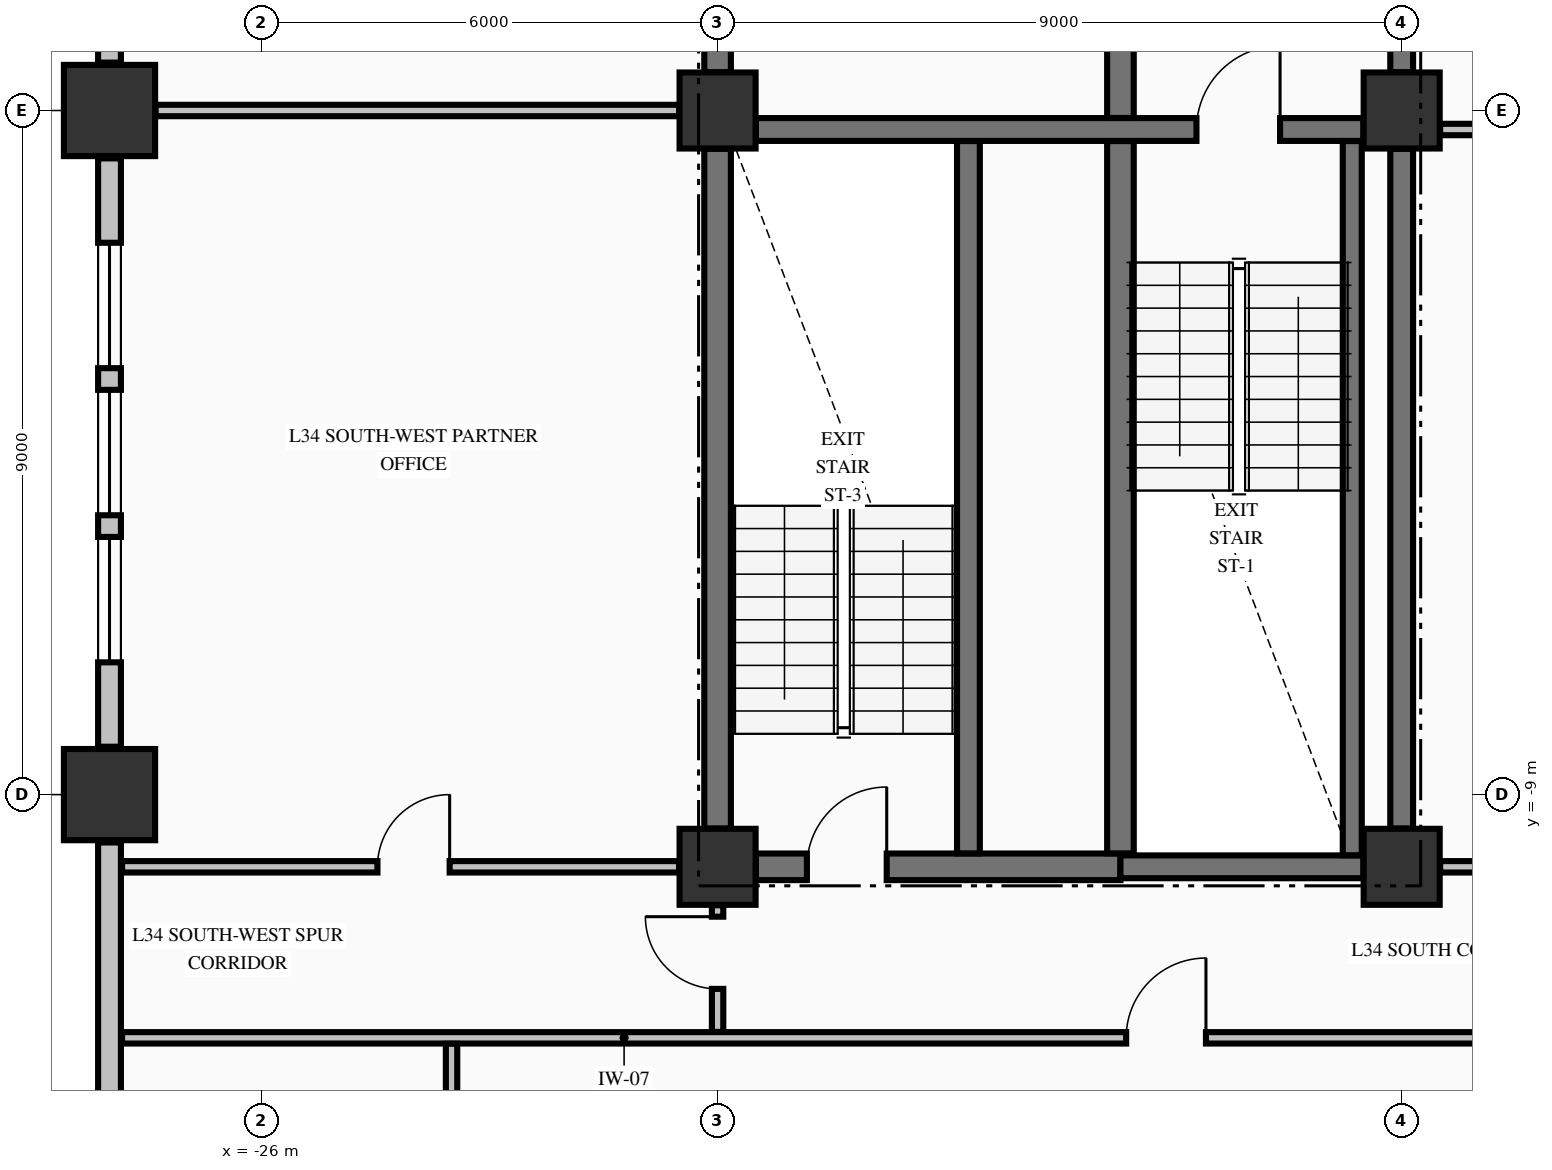
"""IFC4 building model, lengths in metres.
Left out: names, types, materials, properties, quantities, classifications, styles, units other than length and angle.
Written with IfcOpenShell. Run it as: python <this file> out.ifc"""

import sys

from ifc_helpers import new_model, si_unit, direction, frame, frame_2d, origin, origin_2d, place, context, subcontext, project, spatial, rectangle, extrude, element, fill, save


model = new_model("IFC4")
c1 = context("Model", 3, precision=1e-05, world=origin(), true_north=direction((0.0, 1.0)))
c2 = subcontext(c1, "Body", "Model", "MODEL_VIEW")
j1 = project(units=[si_unit("LENGTHUNIT", "METRE"), si_unit("PLANEANGLEUNIT", "RADIAN")], contexts=[c1])
p1 = place(None, origin())
s1 = spatial("IfcSite", under=j1, at=p1, CompositionType="ELEMENT")
p2 = place(p1, origin())
s2 = spatial("IfcBuilding", under=s1, at=p2, CompositionType="ELEMENT")
p3 = place(p2, frame((0.0, 0.0, 135.63)))
s3 = spatial("IfcBuildingStorey", under=s2, at=p3, CompositionType="ELEMENT", Elevation=135.63)
for number, where, z_axis, x_axis in (
    (1, (-28.0, -9.0, -0.25), (0.0, 0.0, 1.0), (1.0, 0.0, 0.0)),
    (2, (-28.0, 0.0, -0.25), (0.0, 0.0, 1.0), (1.0, 0.0, 0.0)),
):
    element("IfcColumn", number, at=place(p3, frame(where, z_axis=z_axis, x_axis=x_axis)), inside=s3, PredefinedType="COLUMN", context=c2, shape_type="SweptSolid", body=[
        extrude(rectangle(XDim=1.2, YDim=1.2, at=origin_2d()), origin(), (0.0, 0.0, 1.0), 3.57),
    ])
for number, where, z_axis, x_axis in (
    (3, (-20.0, -9.95, -0.25), (0.0, 0.0, 1.0), (1.0, 0.0, 0.0)),
    (4, (-11.0, -9.95, -0.25), (0.0, 0.0, 1.0), (1.0, 0.0, 0.0)),
    (5, (-11.0, 0.0, -0.25), (0.0, 0.0, 1.0), (1.0, 0.0, 0.0)),
    (6, (-20.0, 0.0, -0.25), (0.0, 0.0, 1.0), (1.0, 0.0, 0.0)),
):
    element("IfcColumn", number, at=place(p3, frame(where, z_axis=z_axis, x_axis=x_axis)), inside=s3, PredefinedType="COLUMN", context=c2, shape_type="SweptSolid", body=[
        extrude(rectangle(XDim=1.0, YDim=1.0, at=origin_2d()), origin(), (0.0, 0.0, 1.0), 3.57),
    ])
p4 = place(p3, frame((-28.0, -9.63, 0.0), z_axis=(0.0, 0.0, 1.0), x_axis=(0.0, -1.0, 0.0)))
e7 = element("IfcWall", 7, at=p4, inside=s3, PredefinedType="STANDARD", context=c2, shape_type="SweptSolid", body=[
    extrude(rectangle(XDim=10.74, YDim=0.3, at=frame_2d((5.37, 0.0))), origin(), (0.0, 0.0, 1.0), 2.712),
])
p5 = place(p3, frame((-28.0, -0.63, 0.0), z_axis=(0.0, 0.0, 1.0), x_axis=(0.0, -1.0, 0.0)))
e8 = element("IfcWall", 8, at=p5, inside=s3, PredefinedType="STANDARD", context=c2, shape_type="SweptSolid", body=[
    extrude(rectangle(XDim=7.74, YDim=0.3, at=frame_2d((3.87, 0.0))), origin(), (0.0, 0.0, 1.0), 2.712),
])
p6 = place(p5, frame((1.11, 0.0, 0.8)))
e9 = element("IfcOpeningElement", 9, at=p6, cuts=e8, PredefinedType="OPENING", context=c2, shape_type="SweptSolid", body=[
    extrude(rectangle(XDim=1.65, YDim=1.7, at=frame_2d((0.825, 0.85))), frame((0.0, 0.16, 0.0), z_axis=(0.0, -1.0, 0.0), x_axis=(1.0, 0.0, 0.0)), (0.0, 0.0, 1.0), 0.32),
])
p7 = place(p5, frame((3.045, 0.0, 0.8)))
e10 = element("IfcOpeningElement", 10, at=p7, cuts=e8, PredefinedType="OPENING", context=c2, shape_type="SweptSolid", body=[
    extrude(rectangle(XDim=1.65, YDim=1.7, at=frame_2d((0.825, 0.85))), frame((0.0, 0.16, 0.0), z_axis=(0.0, -1.0, 0.0), x_axis=(1.0, 0.0, 0.0)), (0.0, 0.0, 1.0), 0.32),
])
p8 = place(p5, frame((4.98, 0.0, 0.8)))
e11 = element("IfcOpeningElement", 11, at=p8, cuts=e8, PredefinedType="OPENING", context=c2, shape_type="SweptSolid", body=[
    extrude(rectangle(XDim=1.65, YDim=1.7, at=frame_2d((0.825, 0.85))), frame((0.0, 0.16, 0.0), z_axis=(0.0, -1.0, 0.0), x_axis=(1.0, 0.0, 0.0)), (0.0, 0.0, 1.0), 0.32),
])
p9 = place(p3, frame((-28.0, 8.37, 0.0), z_axis=(0.0, 0.0, 1.0), x_axis=(0.0, -1.0, 0.0)))
e12 = element("IfcWall", 12, at=p9, inside=s3, PredefinedType="STANDARD", context=c2, shape_type="SweptSolid", body=[
    extrude(rectangle(XDim=7.74, YDim=0.3, at=frame_2d((3.87, 0.0))), origin(), (0.0, 0.0, 1.0), 2.712),
])
p10 = place(p9, frame((1.11, 0.0, 0.8)))
e13 = element("IfcOpeningElement", 13, at=p10, cuts=e12, PredefinedType="OPENING", context=c2, shape_type="SweptSolid", body=[
    extrude(rectangle(XDim=1.65, YDim=1.7, at=frame_2d((0.825, 0.85))), frame((0.0, 0.16, 0.0), z_axis=(0.0, -1.0, 0.0), x_axis=(1.0, 0.0, 0.0)), (0.0, 0.0, 1.0), 0.32),
])
p11 = place(p9, frame((3.045, 0.0, 0.8)))
e14 = element("IfcOpeningElement", 14, at=p11, cuts=e12, PredefinedType="OPENING", context=c2, shape_type="SweptSolid", body=[
    extrude(rectangle(XDim=1.65, YDim=1.7, at=frame_2d((0.825, 0.85))), frame((0.0, 0.16, 0.0), z_axis=(0.0, -1.0, 0.0), x_axis=(1.0, 0.0, 0.0)), (0.0, 0.0, 1.0), 0.32),
])
p12 = place(p9, frame((4.98, 0.0, 0.8)))
e15 = element("IfcOpeningElement", 15, at=p12, cuts=e12, PredefinedType="OPENING", context=c2, shape_type="SweptSolid", body=[
    extrude(rectangle(XDim=1.65, YDim=1.7, at=frame_2d((0.825, 0.85))), frame((0.0, 0.16, 0.0), z_axis=(0.0, -1.0, 0.0), x_axis=(1.0, 0.0, 0.0)), (0.0, 0.0, 1.0), 0.32),
])
p13 = place(p3, frame((-19.496, -9.95, 0.0), z_axis=(0.0, 0.0, 1.0), x_axis=(1.0, 0.0, 0.0)))
e16 = element("IfcWall", 16, at=p13, inside=s3, PredefinedType="SHEAR", context=c2, shape_type="SweptSolid", body=[
    extrude(rectangle(XDim=4.796, YDim=0.35, at=frame_2d((2.398, 0.0))), origin(), (0.0, 0.0, 1.0), 3.32),
])
p14 = place(p13, frame((0.671, 0.0, 0.0)))
e17 = element("IfcOpeningElement", 17, at=p14, cuts=e16, PredefinedType="OPENING", context=c2, shape_type="SweptSolid", body=[
    extrude(rectangle(XDim=1.05, YDim=2.15, at=frame_2d((0.525, 1.075))), frame((0.0, 0.185, 0.0), z_axis=(0.0, -1.0, 0.0), x_axis=(1.0, 0.0, 0.0)), (0.0, 0.0, 1.0), 0.37),
])
p15 = place(p3, frame((-14.7, -9.95, 0.0), z_axis=(0.0, 0.0, 1.0), x_axis=(1.0, 0.0, 0.0)))
e18 = element("IfcWall", 18, at=p15, inside=s3, PredefinedType="SHEAR", context=c2, shape_type="SweptSolid", body=[
    extrude(rectangle(XDim=3.196, YDim=0.3, at=frame_2d((1.598, 0.0))), origin(), (0.0, 0.0, 1.0), 3.32),
])
p16 = place(p3, frame((-19.496, -0.25, 0.0), z_axis=(0.0, 0.0, 1.0), x_axis=(1.0, 0.0, 0.0)))
e19 = element("IfcWall", 19, at=p16, inside=s3, PredefinedType="SHEAR", context=c2, shape_type="SweptSolid", body=[
    extrude(rectangle(XDim=7.992, YDim=0.3, at=frame_2d((3.996, 0.0))), origin(), (0.0, 0.0, 1.0), 3.32),
])
p17 = place(p16, frame((5.796, 0.0, 0.0)))
e20 = element("IfcOpeningElement", 20, at=p17, cuts=e19, PredefinedType="OPENING", context=c2, shape_type="SweptSolid", body=[
    extrude(rectangle(XDim=1.1, YDim=2.15, at=frame_2d((0.55, 1.075))), frame((0.0, 0.16, 0.0), z_axis=(0.0, -1.0, 0.0), x_axis=(1.0, 0.0, 0.0)), (0.0, 0.0, 1.0), 0.32),
])
p18 = place(p3, frame((-27.835, -12.2, 0.0), z_axis=(0.0, 0.0, 1.0), x_axis=(1.0, 0.0, 0.0)))
e21 = element("IfcWall", 21, at=p18, inside=s3, PredefinedType="PARTITIONING", context=c2, shape_type="SweptSolid", body=[
    extrude(rectangle(XDim=50.67, YDim=0.15, at=frame_2d((25.335, 0.0))), origin(), (0.0, 0.0, 1.0), 3.32),
])
p19 = place(p18, frame((13.21, 0.0, 0.0)))
e22 = element("IfcOpeningElement", 22, at=p19, cuts=e21, PredefinedType="OPENING", context=c2, shape_type="SweptSolid", body=[
    extrude(rectangle(XDim=1.05, YDim=2.15, at=frame_2d((0.525, 1.075))), frame((0.0, 0.085, 0.0), z_axis=(0.0, -1.0, 0.0), x_axis=(1.0, 0.0, 0.0)), (0.0, 0.0, 1.0), 0.17),
])
p20 = place(p18, frame((23.11, 0.0, 0.0)))
e23 = element("IfcOpeningElement", 23, at=p20, cuts=e21, PredefinedType="OPENING", context=c2, shape_type="SweptSolid", body=[
    extrude(rectangle(XDim=1.05, YDim=2.15, at=frame_2d((0.525, 1.075))), frame((0.0, 0.085, 0.0), z_axis=(0.0, -1.0, 0.0), x_axis=(1.0, 0.0, 0.0)), (0.0, 0.0, 1.0), 0.17),
])
p21 = place(p18, frame((31.51, 0.0, 0.0)))
e24 = element("IfcOpeningElement", 24, at=p21, cuts=e21, PredefinedType="OPENING", context=c2, shape_type="SweptSolid", body=[
    extrude(rectangle(XDim=1.05, YDim=2.15, at=frame_2d((0.525, 1.075))), frame((0.0, 0.085, 0.0), z_axis=(0.0, -1.0, 0.0), x_axis=(1.0, 0.0, 0.0)), (0.0, 0.0, 1.0), 0.17),
])
p22 = place(p18, frame((40.76, 0.0, 0.0)))
e25 = element("IfcOpeningElement", 25, at=p22, cuts=e21, PredefinedType="OPENING", context=c2, shape_type="SweptSolid", body=[
    extrude(rectangle(XDim=1.05, YDim=2.15, at=frame_2d((0.525, 1.075))), frame((0.0, 0.085, 0.0), z_axis=(0.0, -1.0, 0.0), x_axis=(1.0, 0.0, 0.0)), (0.0, 0.0, 1.0), 0.17),
])
p23 = place(p3, frame((-27.835, -9.95, 0.0), z_axis=(0.0, 0.0, 1.0), x_axis=(1.0, 0.0, 0.0)))
e26 = element("IfcWall", 26, at=p23, inside=s3, PredefinedType="PARTITIONING", context=c2, shape_type="SweptSolid", body=[
    extrude(rectangle(XDim=7.329, YDim=0.15, at=frame_2d((3.665, 0.0))), origin(), (0.0, 0.0, 1.0), 3.32),
])
p24 = place(p23, frame((3.36, 0.0, 0.0)))
e27 = element("IfcOpeningElement", 27, at=p24, cuts=e26, PredefinedType="OPENING", context=c2, shape_type="SweptSolid", body=[
    extrude(rectangle(XDim=0.95, YDim=2.15, at=frame_2d((0.475, 1.075))), frame((0.0, 0.085, 0.0), z_axis=(0.0, -1.0, 0.0), x_axis=(1.0, 0.0, 0.0)), (0.0, 0.0, 1.0), 0.17),
])
p25 = place(p3, frame((-10.494, -9.95, 0.0), z_axis=(0.0, 0.0, 1.0), x_axis=(1.0, 0.0, 0.0)))
e28 = element("IfcWall", 28, at=p25, inside=s3, PredefinedType="PARTITIONING", context=c2, shape_type="SweptSolid", body=[
    extrude(rectangle(XDim=20.988, YDim=0.15, at=frame_2d((10.494, 0.0))), origin(), (0.0, 0.0, 1.0), 3.32),
])
p26 = place(p25, frame((8.194, 0.0, 0.0)))
e29 = element("IfcOpeningElement", 29, at=p26, cuts=e28, PredefinedType="OPENING", context=c2, shape_type="SweptSolid", body=[
    extrude(rectangle(XDim=1.1, YDim=2.15, at=frame_2d((0.55, 1.075))), frame((0.0, 0.085, 0.0), z_axis=(0.0, -1.0, 0.0), x_axis=(1.0, 0.0, 0.0)), (0.0, 0.0, 1.0), 0.17),
])
p27 = place(p25, frame((13.619, 0.0, 0.0)))
e30 = element("IfcOpeningElement", 30, at=p27, cuts=e28, PredefinedType="OPENING", context=c2, shape_type="SweptSolid", body=[
    extrude(rectangle(XDim=0.95, YDim=2.15, at=frame_2d((0.475, 1.075))), frame((0.0, 0.085, 0.0), z_axis=(0.0, -1.0, 0.0), x_axis=(1.0, 0.0, 0.0)), (0.0, 0.0, 1.0), 0.17),
])
p28 = place(p25, frame((17.844, 0.0, 0.0)))
e31 = element("IfcOpeningElement", 31, at=p28, cuts=e28, PredefinedType="OPENING", context=c2, shape_type="SweptSolid", body=[
    extrude(rectangle(XDim=0.9, YDim=2.15, at=frame_2d((0.45, 1.075))), frame((0.0, 0.085, 0.0), z_axis=(0.0, -1.0, 0.0), x_axis=(1.0, 0.0, 0.0)), (0.0, 0.0, 1.0), 0.17),
])
p29 = place(p3, frame((-10.494, -0.25, 0.0), z_axis=(0.0, 0.0, 1.0), x_axis=(1.0, 0.0, 0.0)))
e32 = element("IfcWall", 32, at=p29, inside=s3, PredefinedType="PARTITIONING", context=c2, shape_type="SweptSolid", body=[
    extrude(rectangle(XDim=20.988, YDim=0.15, at=frame_2d((10.494, 0.0))), origin(), (0.0, 0.0, 1.0), 3.32),
])
p30 = place(p29, frame((8.194, 0.0, 0.0)))
e33 = element("IfcOpeningElement", 33, at=p30, cuts=e32, PredefinedType="OPENING", context=c2, shape_type="SweptSolid", body=[
    extrude(rectangle(XDim=1.1, YDim=2.15, at=frame_2d((0.55, 1.075))), frame((0.0, 0.085, 0.0), z_axis=(0.0, -1.0, 0.0), x_axis=(1.0, 0.0, 0.0)), (0.0, 0.0, 1.0), 0.17),
])
p31 = place(p29, frame((3.049, 0.0, 0.0)))
e34 = element("IfcOpeningElement", 34, at=p31, cuts=e32, PredefinedType="OPENING", context=c2, shape_type="SweptSolid", body=[
    extrude(rectangle(XDim=1.05, YDim=2.15, at=frame_2d((0.525, 1.075))), frame((0.0, 0.085, 0.0), z_axis=(0.0, -1.0, 0.0), x_axis=(1.0, 0.0, 0.0)), (0.0, 0.0, 1.0), 0.17),
])
p32 = place(p29, frame((15.189, 0.0, 0.0)))
e35 = element("IfcOpeningElement", 35, at=p32, cuts=e32, PredefinedType="OPENING", context=c2, shape_type="SweptSolid", body=[
    extrude(rectangle(XDim=0.95, YDim=2.15, at=frame_2d((0.475, 1.075))), frame((0.0, 0.085, 0.0), z_axis=(0.0, -1.0, 0.0), x_axis=(1.0, 0.0, 0.0)), (0.0, 0.0, 1.0), 0.17),
])
p33 = place(p3, frame((-27.394, 0.0, 0.0), z_axis=(0.0, 0.0, 1.0), x_axis=(1.0, 0.0, 0.0)))
e36 = element("IfcWall", 36, at=p33, inside=s3, PredefinedType="PARTITIONING", context=c2, shape_type="SweptSolid", body=[
    extrude(rectangle(XDim=6.888, YDim=0.15, at=frame_2d((3.444, 0.0))), origin(), (0.0, 0.0, 1.0), 2.81),
])
p34 = place(p3, frame((-20.0, -9.446, 0.0), z_axis=(0.0, 0.0, 1.0), x_axis=(0.0, 1.0, 0.0)))
e37 = element("IfcWall", 37, at=p34, inside=s3, PredefinedType="SHEAR", context=c2, shape_type="SweptSolid", body=[
    extrude(rectangle(XDim=8.942, YDim=0.35, at=frame_2d((4.471, 0.0))), origin(), (0.0, 0.0, 1.0), 3.32),
])
p35 = place(p3, frame((-20.0, 0.504, 0.0), z_axis=(0.0, 0.0, 1.0), x_axis=(0.0, 1.0, 0.0)))
e38 = element("IfcWall", 38, at=p35, inside=s3, PredefinedType="SHEAR", context=c2, shape_type="SweptSolid", body=[
    extrude(rectangle(XDim=9.492, YDim=0.35, at=frame_2d((4.746, 0.0))), origin(), (0.0, 0.0, 1.0), 3.32),
])
p36 = place(p3, frame((-16.7, -9.773, 0.0), z_axis=(0.0, 0.0, 1.0), x_axis=(0.0, 1.0, 0.0)))
e39 = element("IfcWall", 39, at=p36, inside=s3, PredefinedType="SHEAR", context=c2, shape_type="SweptSolid", body=[
    extrude(rectangle(XDim=9.371, YDim=0.3, at=frame_2d((4.686, 0.0))), origin(), (0.0, 0.0, 1.0), 3.32),
])
p37 = place(p3, frame((-14.7, -9.773, 0.0), z_axis=(0.0, 0.0, 1.0), x_axis=(0.0, 1.0, 0.0)))
e40 = element("IfcWall", 40, at=p37, inside=s3, PredefinedType="SHEAR", context=c2, shape_type="SweptSolid", body=[
    extrude(rectangle(XDim=9.371, YDim=0.35, at=frame_2d((4.686, 0.0))), origin(), (0.0, 0.0, 1.0), 3.32),
])
p38 = place(p3, frame((-14.7, -0.098, 0.0), z_axis=(0.0, 0.0, 1.0), x_axis=(0.0, 1.0, 0.0)))
e41 = element("IfcWall", 41, at=p38, inside=s3, PredefinedType="SHEAR", context=c2, shape_type="SweptSolid", body=[
    extrude(rectangle(XDim=2.846, YDim=0.35, at=frame_2d((1.423, 0.0))), origin(), (0.0, 0.0, 1.0), 3.32),
])
p39 = place(p3, frame((-11.65, -9.798, 0.0), z_axis=(0.0, 0.0, 1.0), x_axis=(0.0, 1.0, 0.0)))
e42 = element("IfcWall", 42, at=p39, inside=s3, PredefinedType="SOLIDWALL", context=c2, shape_type="SweptSolid", body=[
    extrude(rectangle(XDim=9.396, YDim=0.25, at=frame_2d((4.698, 0.0))), origin(), (0.0, 0.0, 1.0), 3.32),
])
p40 = place(p3, frame((-11.0, -9.446, 0.0), z_axis=(0.0, 0.0, 1.0), x_axis=(0.0, 1.0, 0.0)))
e43 = element("IfcWall", 43, at=p40, inside=s3, PredefinedType="SHEAR", context=c2, shape_type="SweptSolid", body=[
    extrude(rectangle(XDim=8.942, YDim=0.3, at=frame_2d((4.471, 0.0))), origin(), (0.0, 0.0, 1.0), 3.32),
])
p41 = place(p3, frame((-11.0, 0.504, 0.0), z_axis=(0.0, 0.0, 1.0), x_axis=(0.0, 1.0, 0.0)))
e44 = element("IfcWall", 44, at=p41, inside=s3, PredefinedType="SHEAR", context=c2, shape_type="SweptSolid", body=[
    extrude(rectangle(XDim=2.244, YDim=0.3, at=frame_2d((1.122, 0.0))), origin(), (0.0, 0.0, 1.0), 3.32),
])
p42 = place(p41, frame((0.596, 0.0, 0.0)))
e45 = element("IfcOpeningElement", 45, at=p42, cuts=e44, PredefinedType="OPENING", context=c2, shape_type="SweptSolid", body=[
    extrude(rectangle(XDim=1.1, YDim=2.15, at=frame_2d((0.55, 1.075))), frame((0.0, 0.16, 0.0), z_axis=(0.0, -1.0, 0.0), x_axis=(1.0, 0.0, 0.0)), (0.0, 0.0, 1.0), 0.32),
])
p43 = place(p3, frame((-23.5, -20.394, 0.0), z_axis=(0.0, 0.0, 1.0), x_axis=(0.0, 1.0, 0.0)))
e46 = element("IfcWall", 46, at=p43, inside=s3, PredefinedType="PARTITIONING", context=c2, shape_type="SweptSolid", body=[
    extrude(rectangle(XDim=8.116, YDim=0.15, at=frame_2d((4.058, 0.0))), origin(), (0.0, 0.0, 1.0), 3.32),
])
p44 = place(p3, frame((-20.0, -12.122, 0.0), z_axis=(0.0, 0.0, 1.0), x_axis=(0.0, 1.0, 0.0)))
e47 = element("IfcWall", 47, at=p44, inside=s3, PredefinedType="PARTITIONING", context=c2, shape_type="SweptSolid", body=[
    extrude(rectangle(XDim=1.666, YDim=0.15, at=frame_2d((0.833, 0.0))), origin(), (0.0, 0.0, 1.0), 2.81),
])
p45 = place(p44, frame((0.566, 0.0, 0.0)))
e48 = element("IfcOpeningElement", 48, at=p45, cuts=e47, PredefinedType="OPENING", context=c2, shape_type="SweptSolid", body=[
    extrude(rectangle(XDim=0.95, YDim=2.15, at=frame_2d((0.475, 1.075))), frame((0.0, 0.085, 0.0), z_axis=(0.0, -1.0, 0.0), x_axis=(1.0, 0.0, 0.0)), (0.0, 0.0, 1.0), 0.17),
])
p46 = place(p6, origin())
e49 = element("IfcWindow", 49, at=p46, inside=s3, PartitioningType="SINGLE_PANEL", PredefinedType="WINDOW", context=c2, shape_type="SweptSolid", body=[
    extrude(rectangle(XDim=1.65, YDim=1.7, at=frame_2d((0.825, 0.85))), frame((0.0, 0.03, 0.0), z_axis=(0.0, -1.0, 0.0), x_axis=(1.0, 0.0, 0.0)), (0.0, 0.0, 1.0), 0.06),
])
fill(e9, e49)
p47 = place(p7, origin())
e50 = element("IfcWindow", 50, at=p47, inside=s3, PartitioningType="SINGLE_PANEL", PredefinedType="WINDOW", context=c2, shape_type="SweptSolid", body=[
    extrude(rectangle(XDim=1.65, YDim=1.7, at=frame_2d((0.825, 0.85))), frame((0.0, 0.03, 0.0), z_axis=(0.0, -1.0, 0.0), x_axis=(1.0, 0.0, 0.0)), (0.0, 0.0, 1.0), 0.06),
])
fill(e10, e50)
p48 = place(p8, origin())
e51 = element("IfcWindow", 51, at=p48, inside=s3, PartitioningType="SINGLE_PANEL", PredefinedType="WINDOW", context=c2, shape_type="SweptSolid", body=[
    extrude(rectangle(XDim=1.65, YDim=1.7, at=frame_2d((0.825, 0.85))), frame((0.0, 0.03, 0.0), z_axis=(0.0, -1.0, 0.0), x_axis=(1.0, 0.0, 0.0)), (0.0, 0.0, 1.0), 0.06),
])
fill(e11, e51)
p49 = place(p17, origin())
e52 = element("IfcDoor", 52, at=p49, inside=s3, OperationType="SINGLE_SWING_RIGHT", PredefinedType="DOOR", context=c2, shape_type="SweptSolid", body=[
    extrude(rectangle(XDim=1.1, YDim=2.15, at=frame_2d((0.55, 1.075))), frame((0.0, 0.025, 0.0), z_axis=(0.0, -1.0, 0.0), x_axis=(1.0, 0.0, 0.0)), (0.0, 0.0, 1.0), 0.05),
])
fill(e20, e52)
p50 = place(p14, origin())
e53 = element("IfcDoor", 53, at=p50, inside=s3, OperationType="SINGLE_SWING_RIGHT", PredefinedType="DOOR", context=c2, shape_type="SweptSolid", body=[
    extrude(rectangle(XDim=1.05, YDim=2.15, at=frame_2d((0.525, 1.075))), frame((0.0, 0.025, 0.0), z_axis=(0.0, -1.0, 0.0), x_axis=(1.0, 0.0, 0.0)), (0.0, 0.0, 1.0), 0.05),
])
fill(e17, e53)
p51 = place(p19, origin())
e54 = element("IfcDoor", 54, at=p51, inside=s3, OperationType="SINGLE_SWING_RIGHT", PredefinedType="DOOR", context=c2, shape_type="SweptSolid", body=[
    extrude(rectangle(XDim=1.05, YDim=2.15, at=frame_2d((0.525, 1.075))), frame((0.0, 0.025, 0.0), z_axis=(0.0, -1.0, 0.0), x_axis=(1.0, 0.0, 0.0)), (0.0, 0.0, 1.0), 0.05),
])
fill(e22, e54)
p52 = place(p45, origin())
e55 = element("IfcDoor", 55, at=p52, inside=s3, OperationType="SINGLE_SWING_RIGHT", PredefinedType="DOOR", context=c2, shape_type="SweptSolid", body=[
    extrude(rectangle(XDim=0.95, YDim=2.15, at=frame_2d((0.475, 1.075))), frame((0.0, 0.025, 0.0), z_axis=(0.0, -1.0, 0.0), x_axis=(1.0, 0.0, 0.0)), (0.0, 0.0, 1.0), 0.05),
])
fill(e48, e55)
p53 = place(p24, origin())
e56 = element("IfcDoor", 56, at=p53, inside=s3, OperationType="SINGLE_SWING_RIGHT", PredefinedType="DOOR", context=c2, shape_type="SweptSolid", body=[
    extrude(rectangle(XDim=0.95, YDim=2.15, at=frame_2d((0.475, 1.075))), frame((0.0, 0.025, 0.0), z_axis=(0.0, -1.0, 0.0), x_axis=(1.0, 0.0, 0.0)), (0.0, 0.0, 1.0), 0.05),
])
fill(e27, e56)
save(model, sys.argv[1])
